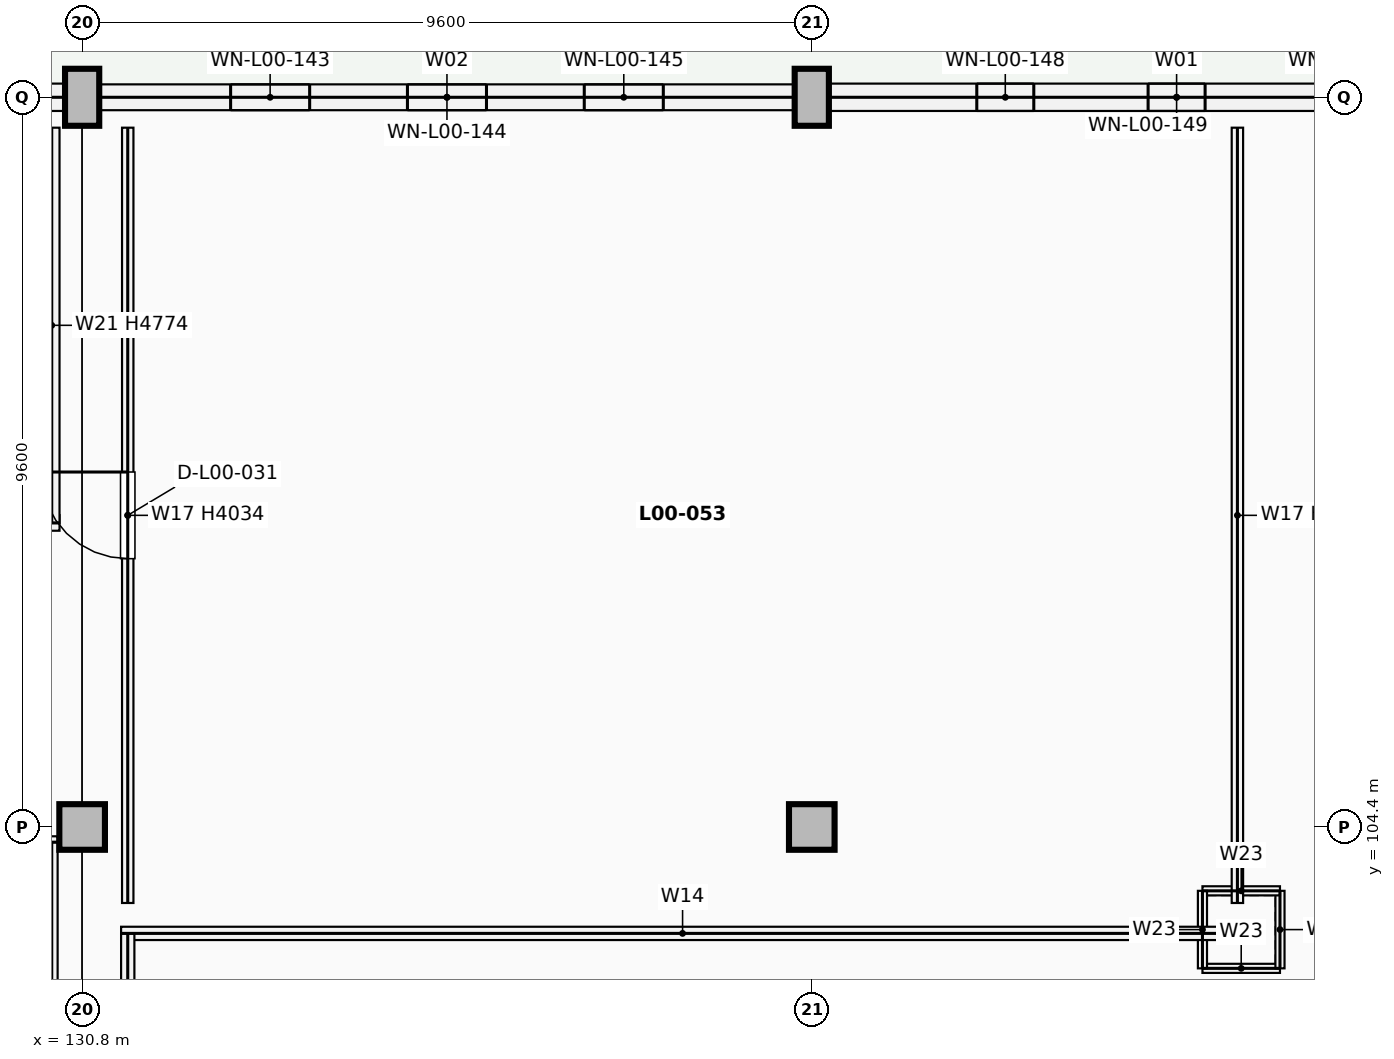
"""IFC4 building model, lengths in metres.
Left out: names, types, materials, properties, quantities, classifications, styles, units other than length and angle.
Written with IfcOpenShell. Run it as: python <this file> out.ifc"""

import sys

from ifc_helpers import new_model, si_unit, direction, frame, frame_2d, origin, origin_2d, place, context, subcontext, project, spatial, rectangle, extrude, element, fill, save


model = new_model("IFC4")
c1 = context("Model", 3, precision=1e-05, world=origin(), true_north=direction((0.0, 1.0)))
c2 = subcontext(c1, "Body", "Model", "MODEL_VIEW")
j1 = project(units=[si_unit("LENGTHUNIT", "METRE"), si_unit("PLANEANGLEUNIT", "RADIAN")], contexts=[c1])
p1 = place(None, origin())
s1 = spatial("IfcSite", under=j1, at=p1, CompositionType="ELEMENT")
p2 = place(p1, origin())
s2 = spatial("IfcBuilding", under=s1, at=p2, CompositionType="ELEMENT")
p3 = place(p2, origin())
s3 = spatial("IfcBuildingStorey", under=s2, at=p3, CompositionType="ELEMENT", Elevation=0.0)
p4 = place(p3, frame((130.8, 104.4, 0.0), z_axis=(0.0, 0.0, 1.0), x_axis=(1.0, 0.0, 0.0)))
e1 = element("IfcColumn", 1, at=p4, inside=s3, PredefinedType="COLUMN", context=c2, shape_type="SweptSolid", body=[
    extrude(rectangle(XDim=0.6, YDim=0.6, at=origin_2d()), origin(), (0.0, 0.0, 1.0), 5.1),
])
p5 = place(p3, frame((130.8, 114.0, 0.0), z_axis=(0.0, 0.0, 1.0), x_axis=(1.0, 0.0, 0.0)))
e2 = element("IfcColumn", 2, at=p5, inside=s3, PredefinedType="PILASTER", context=c2, shape_type="SweptSolid", body=[
    extrude(rectangle(XDim=0.45, YDim=0.75, at=origin_2d()), origin(), (0.0, 0.0, 1.0), 5.1),
])
p6 = place(p3, frame((140.4, 104.4, 0.0), z_axis=(0.0, 0.0, 1.0), x_axis=(1.0, 0.0, 0.0)))
e3 = element("IfcColumn", 3, at=p6, inside=s3, PredefinedType="COLUMN", context=c2, shape_type="SweptSolid", body=[
    extrude(rectangle(XDim=0.6, YDim=0.6, at=origin_2d()), origin(), (0.0, 0.0, 1.0), 5.1),
])
p7 = place(p3, frame((140.4, 114.0, 0.0), z_axis=(0.0, 0.0, 1.0), x_axis=(1.0, 0.0, 0.0)))
e4 = element("IfcColumn", 4, at=p7, inside=s3, PredefinedType="PILASTER", context=c2, shape_type="SweptSolid", body=[
    extrude(rectangle(XDim=0.45, YDim=0.75, at=origin_2d()), origin(), (0.0, 0.0, 1.0), 5.1),
])
p8 = place(p3, frame((127.427, 114.0, 0.0), z_axis=(0.0, 0.0, 1.0), x_axis=(1.0, 0.0, 0.0)))
e5 = element("IfcWall", 5, at=p8, inside=s3, PredefinedType="SOLIDWALL", context=c2, shape_type="SweptSolid", body=[
    extrude(rectangle(XDim=3.146, YDim=0.36, at=frame_2d((1.573, 0.0))), origin(), (0.0, 0.0, 1.0), 4.284),
])
p9 = place(p8, frame((1.113, 0.0, 0.75)))
e6 = element("IfcOpeningElement", 6, at=p9, cuts=e5, PredefinedType="OPENING", context=c2, shape_type="SweptSolid", body=[
    extrude(rectangle(XDim=0.92, YDim=2.22, at=frame_2d((0.46, 1.11))), frame((0.0, 0.19, 0.0), z_axis=(0.0, -1.0, 0.0), x_axis=(1.0, 0.0, 0.0)), (0.0, 0.0, 1.0), 0.38),
])
p10 = place(p3, frame((131.027, 114.0, 0.0), z_axis=(0.0, 0.0, 1.0), x_axis=(1.0, 0.0, 0.0)))
e7 = element("IfcWall", 7, at=p10, inside=s3, PredefinedType="SOLIDWALL", context=c2, shape_type="SweptSolid", body=[
    extrude(rectangle(XDim=9.146, YDim=0.34, at=frame_2d((4.573, 0.0))), origin(), (0.0, 0.0, 1.0), 4.284),
])
p11 = place(p10, frame((1.727, 0.0, 0.75)))
e8 = element("IfcOpeningElement", 8, at=p11, cuts=e7, PredefinedType="OPENING", context=c2, shape_type="SweptSolid", body=[
    extrude(rectangle(XDim=1.04, YDim=2.18, at=frame_2d((0.52, 1.09))), frame((0.0, 0.18, 0.0), z_axis=(0.0, -1.0, 0.0), x_axis=(1.0, 0.0, 0.0)), (0.0, 0.0, 1.0), 0.36),
])
p12 = place(p10, frame((4.053, 0.0, 0.75)))
e9 = element("IfcOpeningElement", 9, at=p12, cuts=e7, PredefinedType="OPENING", context=c2, shape_type="SweptSolid", body=[
    extrude(rectangle(XDim=1.04, YDim=2.18, at=frame_2d((0.52, 1.09))), frame((0.0, 0.18, 0.0), z_axis=(0.0, -1.0, 0.0), x_axis=(1.0, 0.0, 0.0)), (0.0, 0.0, 1.0), 0.36),
])
p13 = place(p10, frame((6.379, 0.0, 0.75)))
e10 = element("IfcOpeningElement", 10, at=p13, cuts=e7, PredefinedType="OPENING", context=c2, shape_type="SweptSolid", body=[
    extrude(rectangle(XDim=1.04, YDim=2.18, at=frame_2d((0.52, 1.09))), frame((0.0, 0.18, 0.0), z_axis=(0.0, -1.0, 0.0), x_axis=(1.0, 0.0, 0.0)), (0.0, 0.0, 1.0), 0.36),
])
p14 = place(p3, frame((140.627, 114.0, 0.0), z_axis=(0.0, 0.0, 1.0), x_axis=(1.0, 0.0, 0.0)))
e11 = element("IfcWall", 11, at=p14, inside=s3, PredefinedType="SOLIDWALL", context=c2, shape_type="SweptSolid", body=[
    extrude(rectangle(XDim=9.146, YDim=0.36, at=frame_2d((4.573, 0.0))), origin(), (0.0, 0.0, 1.0), 4.284),
])
p15 = place(p14, frame((1.944, 0.0, 0.75)))
e12 = element("IfcOpeningElement", 12, at=p15, cuts=e11, PredefinedType="OPENING", context=c2, shape_type="SweptSolid", body=[
    extrude(rectangle(XDim=0.75, YDim=2.3, at=frame_2d((0.375, 1.15))), frame((0.0, 0.19, 0.0), z_axis=(0.0, -1.0, 0.0), x_axis=(1.0, 0.0, 0.0)), (0.0, 0.0, 1.0), 0.38),
])
p16 = place(p14, frame((4.198, 0.0, 0.75)))
e13 = element("IfcOpeningElement", 13, at=p16, cuts=e11, PredefinedType="OPENING", context=c2, shape_type="SweptSolid", body=[
    extrude(rectangle(XDim=0.75, YDim=2.3, at=frame_2d((0.375, 1.15))), frame((0.0, 0.19, 0.0), z_axis=(0.0, -1.0, 0.0), x_axis=(1.0, 0.0, 0.0)), (0.0, 0.0, 1.0), 0.38),
])
p17 = place(p14, frame((6.452, 0.0, 0.75)))
e14 = element("IfcOpeningElement", 14, at=p17, cuts=e11, PredefinedType="OPENING", context=c2, shape_type="SweptSolid", body=[
    extrude(rectangle(XDim=0.75, YDim=2.3, at=frame_2d((0.375, 1.15))), frame((0.0, 0.19, 0.0), z_axis=(0.0, -1.0, 0.0), x_axis=(1.0, 0.0, 0.0)), (0.0, 0.0, 1.0), 0.38),
])
for number, where, z_axis, x_axis in (
    (15, (145.54, 102.54, 0.0), (0.0, 0.0, 1.0), (1.0, 0.0, 0.0)),
    (16, (146.56, 102.54, 0.0), (0.0, 0.0, 1.0), (0.0, 1.0, 0.0)),
    (17, (146.56, 103.56, 0.0), (0.0, 0.0, 1.0), (-1.0, 0.0, 0.0)),
    (18, (145.54, 103.56, 0.0), (0.0, 0.0, 1.0), (0.0, -1.0, 0.0)),
):
    element("IfcWall", number, at=place(p3, frame(where, z_axis=z_axis, x_axis=x_axis)), inside=s3, PredefinedType="PARTITIONING", context=c2, shape_type="SweptSolid", body=[
        extrude(rectangle(XDim=1.02, YDim=0.12, at=frame_2d((0.51, 0.0))), origin(), (0.0, 0.0, 1.0), 4.774),
    ])
p18 = place(p3, frame((120.123, 104.2, 0.0), z_axis=(0.0, 0.0, 1.0), x_axis=(1.0, 0.0, 0.0)))
e19 = element("IfcWall", 19, at=p18, inside=s3, PredefinedType="PARTITIONING", context=c2, shape_type="SweptSolid", body=[
    extrude(rectangle(XDim=10.355, YDim=0.155, at=frame_2d((5.177, 0.0))), origin(), (0.0, 0.0, 1.0), 4.034),
])
p19 = place(p18, frame((2.417, 0.0, 0.0)))
e20 = element("IfcOpeningElement", 20, at=p19, cuts=e19, PredefinedType="OPENING", context=c2, shape_type="SweptSolid", body=[
    extrude(rectangle(XDim=1.24, YDim=2.2, at=frame_2d((0.62, 1.1))), frame((0.0, 0.087, 0.0), z_axis=(0.0, -1.0, 0.0), x_axis=(1.0, 0.0, 0.0)), (0.0, 0.0, 1.0), 0.175),
])
p20 = place(p3, frame((130.4, 83.2, 0.0), z_axis=(0.0, 0.0, 1.0), x_axis=(0.0, 1.0, 0.0)))
e21 = element("IfcWall", 21, at=p20, inside=s3, PredefinedType="PARTITIONING", context=c2, shape_type="SweptSolid", body=[
    extrude(rectangle(XDim=21.0, YDim=0.155, at=frame_2d((10.5, 0.0))), origin(), (0.0, 0.0, 1.0), 4.034),
])
p21 = place(p3, frame((110.298, 108.4, 0.0), z_axis=(0.0, 0.0, 1.0), x_axis=(1.0, 0.0, 0.0)))
e22 = element("IfcWall", 22, at=p21, inside=s3, PredefinedType="PARTITIONING", context=c2, shape_type="SweptSolid", body=[
    extrude(rectangle(XDim=20.205, YDim=0.205, at=frame_2d((10.103, 0.0))), origin(), (0.0, 0.0, 1.0), 4.284),
])
p22 = place(p21, frame((4.94, 0.0, 0.0)))
e23 = element("IfcOpeningElement", 23, at=p22, cuts=e22, PredefinedType="OPENING", context=c2, shape_type="SweptSolid", body=[
    extrude(rectangle(XDim=1.05, YDim=2.15, at=frame_2d((0.525, 1.075))), frame((0.0, 0.113, 0.0), z_axis=(0.0, -1.0, 0.0), x_axis=(1.0, 0.0, 0.0)), (0.0, 0.0, 1.0), 0.225),
])
p23 = place(p3, frame((130.4, 108.4, 0.0), z_axis=(0.0, 0.0, 1.0), x_axis=(0.0, 1.0, 0.0)))
e24 = element("IfcWall", 24, at=p23, inside=s3, PredefinedType="PARTITIONING", context=c2, shape_type="SweptSolid", body=[
    extrude(rectangle(XDim=5.2, YDim=0.205, at=frame_2d((2.6, 0.0))), origin(), (0.0, 0.0, 1.0), 4.774),
])
p24 = place(p3, frame((131.312, 103.0, 0.0), z_axis=(0.0, 0.0, 1.0), x_axis=(1.0, 0.0, 0.0)))
e25 = element("IfcWall", 25, at=p24, inside=s3, PredefinedType="PARTITIONING", context=c2, shape_type="SweptSolid", body=[
    extrude(rectangle(XDim=14.775, YDim=0.175, at=frame_2d((7.387, 0.0))), origin(), (0.0, 0.0, 1.0), 4.284),
])
p25 = place(p3, frame((131.4, 89.2, 0.0), z_axis=(0.0, 0.0, 1.0), x_axis=(0.0, 1.0, 0.0)))
e26 = element("IfcWall", 26, at=p25, inside=s3, PredefinedType="PARTITIONING", context=c2, shape_type="SweptSolid", body=[
    extrude(rectangle(XDim=13.8, YDim=0.175, at=frame_2d((6.9, 0.0))), origin(), (0.0, 0.0, 1.0), 4.034),
])
p26 = place(p3, frame((131.4, 103.4, 0.0), z_axis=(0.0, 0.0, 1.0), x_axis=(0.0, 1.0, 0.0)))
e27 = element("IfcWall", 27, at=p26, inside=s3, PredefinedType="PARTITIONING", context=c2, shape_type="SweptSolid", body=[
    extrude(rectangle(XDim=10.2, YDim=0.15, at=frame_2d((5.1, 0.0))), origin(), (0.0, 0.0, 1.0), 4.034),
])
p27 = place(p26, frame((4.53, 0.0, 0.0)))
e28 = element("IfcOpeningElement", 28, at=p27, cuts=e27, PredefinedType="OPENING", context=c2, shape_type="SweptSolid", body=[
    extrude(rectangle(XDim=1.14, YDim=2.16, at=frame_2d((0.57, 1.08))), frame((0.0, 0.085, 0.0), z_axis=(0.0, -1.0, 0.0), x_axis=(1.0, 0.0, 0.0)), (0.0, 0.0, 1.0), 0.17),
])
p28 = place(p3, frame((146.0, 103.4, 0.0), z_axis=(0.0, 0.0, 1.0), x_axis=(0.0, 1.0, 0.0)))
e29 = element("IfcWall", 29, at=p28, inside=s3, PredefinedType="PARTITIONING", context=c2, shape_type="SweptSolid", body=[
    extrude(rectangle(XDim=10.2, YDim=0.15, at=frame_2d((5.1, 0.0))), origin(), (0.0, 0.0, 1.0), 4.034),
])
p29 = place(p11, origin())
e30 = element("IfcWindow", 30, at=p29, inside=s3, PartitioningType="SINGLE_PANEL", PredefinedType="WINDOW", context=c2, shape_type="SweptSolid", body=[
    extrude(rectangle(XDim=1.04, YDim=2.18, at=frame_2d((0.52, 1.09))), frame((0.0, 0.03, 0.0), z_axis=(0.0, -1.0, 0.0), x_axis=(1.0, 0.0, 0.0)), (0.0, 0.0, 1.0), 0.06),
])
fill(e8, e30)
p30 = place(p12, origin())
e31 = element("IfcWindow", 31, at=p30, inside=s3, PartitioningType="SINGLE_PANEL", PredefinedType="WINDOW", context=c2, shape_type="SweptSolid", body=[
    extrude(rectangle(XDim=1.04, YDim=2.18, at=frame_2d((0.52, 1.09))), frame((0.0, 0.03, 0.0), z_axis=(0.0, -1.0, 0.0), x_axis=(1.0, 0.0, 0.0)), (0.0, 0.0, 1.0), 0.06),
])
fill(e9, e31)
p31 = place(p13, origin())
e32 = element("IfcWindow", 32, at=p31, inside=s3, PartitioningType="SINGLE_PANEL", PredefinedType="WINDOW", context=c2, shape_type="SweptSolid", body=[
    extrude(rectangle(XDim=1.04, YDim=2.18, at=frame_2d((0.52, 1.09))), frame((0.0, 0.03, 0.0), z_axis=(0.0, -1.0, 0.0), x_axis=(1.0, 0.0, 0.0)), (0.0, 0.0, 1.0), 0.06),
])
fill(e10, e32)
p32 = place(p15, origin())
e33 = element("IfcWindow", 33, at=p32, inside=s3, PartitioningType="SINGLE_PANEL", PredefinedType="WINDOW", context=c2, shape_type="SweptSolid", body=[
    extrude(rectangle(XDim=0.75, YDim=2.3, at=frame_2d((0.375, 1.15))), frame((0.0, 0.03, 0.0), z_axis=(0.0, -1.0, 0.0), x_axis=(1.0, 0.0, 0.0)), (0.0, 0.0, 1.0), 0.06),
])
fill(e12, e33)
p33 = place(p16, origin())
e34 = element("IfcWindow", 34, at=p33, inside=s3, PartitioningType="SINGLE_PANEL", PredefinedType="WINDOW", context=c2, shape_type="SweptSolid", body=[
    extrude(rectangle(XDim=0.75, YDim=2.3, at=frame_2d((0.375, 1.15))), frame((0.0, 0.03, 0.0), z_axis=(0.0, -1.0, 0.0), x_axis=(1.0, 0.0, 0.0)), (0.0, 0.0, 1.0), 0.06),
])
fill(e13, e34)
p34 = place(p27, origin())
e35 = element("IfcDoor", 35, at=p34, inside=s3, OperationType="SINGLE_SWING_RIGHT", PredefinedType="DOOR", context=c2, shape_type="SweptSolid", body=[
    extrude(rectangle(XDim=1.14, YDim=2.16, at=frame_2d((0.57, 1.08))), frame((0.0, 0.025, 0.0), z_axis=(0.0, -1.0, 0.0), x_axis=(1.0, 0.0, 0.0)), (0.0, 0.0, 1.0), 0.05),
])
fill(e28, e35)
save(model, sys.argv[1])
